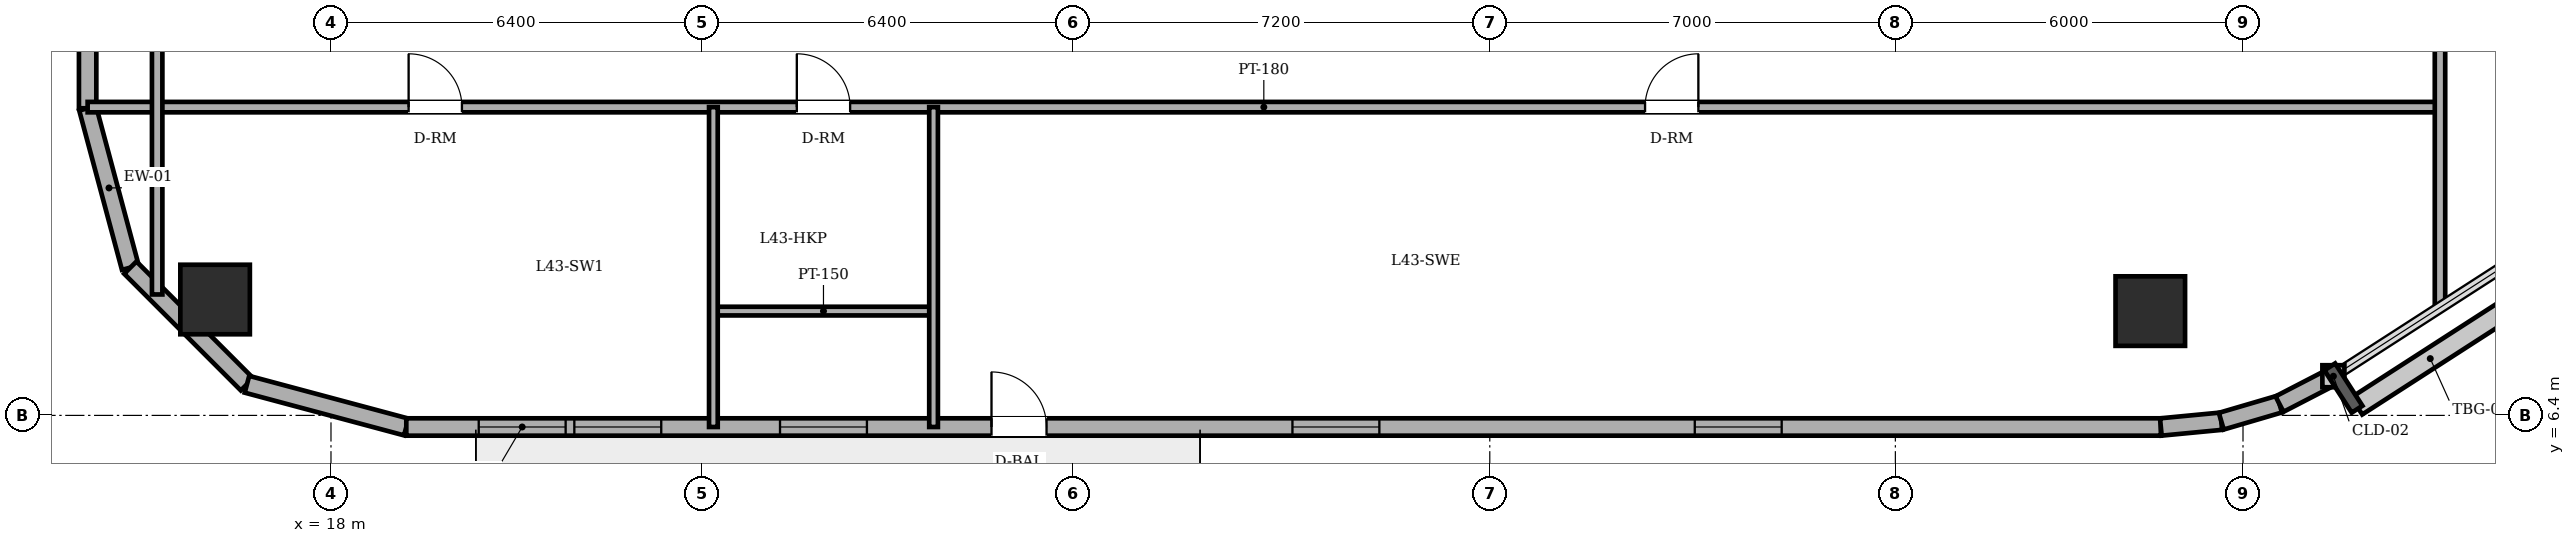
"""IFC4 building model, lengths in metres.
Left out: names, types, materials, properties, quantities, classifications, styles, units other than length and angle.
Written with IfcOpenShell. Run it as: python <this file> out.ifc"""

import sys

from ifc_helpers import new_model, si_unit, direction, frame, frame_2d, origin, origin_2d, place, context, subcontext, project, spatial, rectangle, circle, extrude, element, fill, save


model = new_model("IFC4")
c1 = context("Model", 3, precision=1e-05, world=origin(), true_north=direction((0.0, 1.0)))
c2 = subcontext(c1, "Body", "Model", "MODEL_VIEW")
j1 = project(units=[si_unit("LENGTHUNIT", "METRE"), si_unit("PLANEANGLEUNIT", "RADIAN")], contexts=[c1])
p1 = place(None, origin())
s1 = spatial("IfcSite", under=j1, at=p1, CompositionType="ELEMENT")
p2 = place(p1, origin())
s2 = spatial("IfcBuilding", under=s1, at=p2, CompositionType="ELEMENT")
p3 = place(p2, frame((0.0, 0.0, 165.4)))
s3 = spatial("IfcBuildingStorey", under=s2, at=p3, CompositionType="ELEMENT", Elevation=165.4)
for number, where, z_axis, x_axis in (
    (1, (16.0, 8.4, 0.0), (0.0, 0.0, 1.0), (1.0, 0.0, 0.0)),
    (2, (49.4, 8.2, 0.0), (0.0, 0.0, 1.0), (1.0, 0.0, 0.0)),
):
    element("IfcColumn", number, at=place(p3, frame(where, z_axis=z_axis, x_axis=x_axis)), inside=s3, PredefinedType="COLUMN", context=c2, shape_type="SweptSolid", body=[
        extrude(circle(Radius=0.6, at=origin_2d()), origin(), (0.0, 0.0, 1.0), 3.6),
    ])
p4 = place(p3, frame((13.8, 11.7, 0.0), z_axis=(0.0, 0.0, 1.0), x_axis=(0.258884674387, -0.965908238586, 0.0)))
e3 = element("IfcWall", 3, at=p4, inside=s3, PredefinedType="SOLIDWALL", context=c2, shape_type="SweptSolid", body=[
    extrude(rectangle(XDim=2.847, YDim=0.3, at=frame_2d((1.424, 0.0))), origin(), (0.0, 0.0, 1.0), 3.4),
])
p5 = place(p3, frame((14.537, 8.95, 0.0), z_axis=(0.0, 0.0, 1.0), x_axis=(0.707106781187, -0.707106781187, 0.0)))
e4 = element("IfcWall", 4, at=p5, inside=s3, PredefinedType="SOLIDWALL", context=c2, shape_type="SweptSolid", body=[
    extrude(rectangle(XDim=2.847, YDim=0.3, at=frame_2d((1.423, 0.0))), origin(), (0.0, 0.0, 1.0), 3.4),
])
p6 = place(p3, frame((16.55, 6.937, 0.0), z_axis=(0.0, 0.0, 1.0), x_axis=(0.965908238586, -0.258884674387, 0.0)))
e5 = element("IfcWall", 5, at=p6, inside=s3, PredefinedType="SOLIDWALL", context=c2, shape_type="SweptSolid", body=[
    extrude(rectangle(XDim=2.847, YDim=0.3, at=frame_2d((1.424, 0.0))), origin(), (0.0, 0.0, 1.0), 3.4),
])
p7 = place(p3, frame((19.3, 6.2, 0.0), z_axis=(0.0, 0.0, 1.0), x_axis=(1.0, 0.0, 0.0)))
e6 = element("IfcWall", 6, at=p7, inside=s3, PredefinedType="SOLIDWALL", context=c2, shape_type="SweptSolid", body=[
    extrude(rectangle(XDim=30.282, YDim=0.3, at=frame_2d((15.141, 0.0))), origin(), (0.0, 0.0, 1.0), 3.4),
])
p8 = place(p7, frame((10.1, 0.0, 0.0)))
e7 = element("IfcOpeningElement", 7, at=p8, cuts=e6, PredefinedType="OPENING", context=c2, shape_type="SweptSolid", body=[
    extrude(rectangle(XDim=0.95, YDim=2.2, at=frame_2d((0.475, 1.1))), frame((0.0, 0.16, 0.0), z_axis=(0.0, -1.0, 0.0), x_axis=(1.0, 0.0, 0.0)), (0.0, 0.0, 1.0), 0.32),
])
p9 = place(p7, frame((1.25, 0.0, 0.85)))
e8 = element("IfcOpeningElement", 8, at=p9, cuts=e6, PredefinedType="OPENING", context=c2, shape_type="SweptSolid", body=[
    extrude(rectangle(XDim=1.5, YDim=1.55, at=frame_2d((0.75, 0.775))), frame((0.0, 0.16, 0.0), z_axis=(0.0, -1.0, 0.0), x_axis=(1.0, 0.0, 0.0)), (0.0, 0.0, 1.0), 0.32),
])
p10 = place(p7, frame((2.9, 0.0, 0.85)))
e9 = element("IfcOpeningElement", 9, at=p10, cuts=e6, PredefinedType="OPENING", context=c2, shape_type="SweptSolid", body=[
    extrude(rectangle(XDim=1.5, YDim=1.55, at=frame_2d((0.75, 0.775))), frame((0.0, 0.16, 0.0), z_axis=(0.0, -1.0, 0.0), x_axis=(1.0, 0.0, 0.0)), (0.0, 0.0, 1.0), 0.32),
])
p11 = place(p7, frame((6.45, 0.0, 0.85)))
e10 = element("IfcOpeningElement", 10, at=p11, cuts=e6, PredefinedType="OPENING", context=c2, shape_type="SweptSolid", body=[
    extrude(rectangle(XDim=1.5, YDim=1.55, at=frame_2d((0.75, 0.775))), frame((0.0, 0.16, 0.0), z_axis=(0.0, -1.0, 0.0), x_axis=(1.0, 0.0, 0.0)), (0.0, 0.0, 1.0), 0.32),
])
p12 = place(p7, frame((15.294, 0.0, 0.85)))
e11 = element("IfcOpeningElement", 11, at=p12, cuts=e6, PredefinedType="OPENING", context=c2, shape_type="SweptSolid", body=[
    extrude(rectangle(XDim=1.5, YDim=1.55, at=frame_2d((0.75, 0.775))), frame((0.0, 0.16, 0.0), z_axis=(0.0, -1.0, 0.0), x_axis=(1.0, 0.0, 0.0)), (0.0, 0.0, 1.0), 0.32),
])
p13 = place(p7, frame((22.238, 0.0, 0.85)))
e12 = element("IfcOpeningElement", 12, at=p13, cuts=e6, PredefinedType="OPENING", context=c2, shape_type="SweptSolid", body=[
    extrude(rectangle(XDim=1.5, YDim=1.55, at=frame_2d((0.75, 0.775))), frame((0.0, 0.16, 0.0), z_axis=(0.0, -1.0, 0.0), x_axis=(1.0, 0.0, 0.0)), (0.0, 0.0, 1.0), 0.32),
])
p14 = place(p3, frame((49.582, 6.2, 0.0), z_axis=(0.0, 0.0, 1.0), x_axis=(0.995426089968, 0.095534807324, 0.0)))
e13 = element("IfcWall", 13, at=p14, inside=s3, PredefinedType="SOLIDWALL", context=c2, shape_type="SweptSolid", body=[
    extrude(rectangle(XDim=1.048, YDim=0.3, at=frame_2d((0.524, 0.0))), origin(), (0.0, 0.0, 1.0), 3.4),
])
p15 = place(p3, frame((50.625, 6.3, 0.0), z_axis=(0.0, 0.0, 1.0), x_axis=(0.959528674476, 0.281610942363, 0.0)))
e14 = element("IfcWall", 14, at=p15, inside=s3, PredefinedType="SOLIDWALL", context=c2, shape_type="SweptSolid", body=[
    extrude(rectangle(XDim=1.047, YDim=0.3, at=frame_2d((0.524, 0.0))), origin(), (0.0, 0.0, 1.0), 3.4),
])
p16 = place(p3, frame((51.63, 6.595, 0.0), z_axis=(0.0, 0.0, 1.0), x_axis=(0.888283247196, 0.459296062198, 0.0)))
e15 = element("IfcWall", 15, at=p16, inside=s3, PredefinedType="SOLIDWALL", context=c2, shape_type="SweptSolid", body=[
    extrude(rectangle(XDim=1.047, YDim=0.3, at=frame_2d((0.523, 0.0))), origin(), (0.0, 0.0, 1.0), 3.4),
])
p17 = place(p3, frame((13.8, 36.3, 0.0), z_axis=(0.0, 0.0, 1.0), x_axis=(0.0, -1.0, 0.0)))
e16 = element("IfcWall", 16, at=p17, inside=s3, PredefinedType="SOLIDWALL", context=c2, shape_type="SweptSolid", body=[
    extrude(rectangle(XDim=24.6, YDim=0.3, at=frame_2d((12.3, 0.0))), origin(), (0.0, 0.0, 1.0), 3.4),
])
p18 = place(p17, frame((5.003, 0.0, 0.85)))
e17 = element("IfcOpeningElement", 17, at=p18, cuts=e16, PredefinedType="OPENING", context=c2, shape_type="SweptSolid", body=[
    extrude(rectangle(XDim=1.5, YDim=1.55, at=frame_2d((0.75, 0.775))), frame((0.0, 0.16, 0.0), z_axis=(0.0, -1.0, 0.0), x_axis=(1.0, 0.0, 0.0)), (0.0, 0.0, 1.0), 0.32),
])
p19 = place(p17, frame((8.277, 0.0, 0.85)))
e18 = element("IfcOpeningElement", 18, at=p19, cuts=e16, PredefinedType="OPENING", context=c2, shape_type="SweptSolid", body=[
    extrude(rectangle(XDim=1.5, YDim=1.55, at=frame_2d((0.75, 0.775))), frame((0.0, 0.16, 0.0), z_axis=(0.0, -1.0, 0.0), x_axis=(1.0, 0.0, 0.0)), (0.0, 0.0, 1.0), 0.32),
])
p20 = place(p17, frame((14.823, 0.0, 0.85)))
e19 = element("IfcOpeningElement", 19, at=p20, cuts=e16, PredefinedType="OPENING", context=c2, shape_type="SweptSolid", body=[
    extrude(rectangle(XDim=1.5, YDim=1.55, at=frame_2d((0.75, 0.775))), frame((0.0, 0.16, 0.0), z_axis=(0.0, -1.0, 0.0), x_axis=(1.0, 0.0, 0.0)), (0.0, 0.0, 1.0), 0.32),
])
p21 = place(p17, frame((18.097, 0.0, 0.85)))
e20 = element("IfcOpeningElement", 20, at=p21, cuts=e16, PredefinedType="OPENING", context=c2, shape_type="SweptSolid", body=[
    extrude(rectangle(XDim=1.5, YDim=1.55, at=frame_2d((0.75, 0.775))), frame((0.0, 0.16, 0.0), z_axis=(0.0, -1.0, 0.0), x_axis=(1.0, 0.0, 0.0)), (0.0, 0.0, 1.0), 0.32),
])
p22 = place(p3, frame((24.6, 8.2, 0.0), z_axis=(0.0, 0.0, 1.0), x_axis=(1.0, 0.0, 0.0)))
e21 = element("IfcWall", 21, at=p22, inside=s3, PredefinedType="PARTITIONING", context=c2, shape_type="SweptSolid", body=[
    extrude(rectangle(XDim=3.8, YDim=0.15, at=frame_2d((1.9, 0.0))), origin(), (0.0, 0.0, 1.0), 2.882),
])
p23 = place(p3, frame((13.8, 11.72, 0.0), z_axis=(0.0, 0.0, 1.0), x_axis=(1.0, 0.0, 0.0)))
e22 = element("IfcWall", 22, at=p23, inside=s3, PredefinedType="PARTITIONING", context=c2, shape_type="SweptSolid", body=[
    extrude(rectangle(XDim=40.6, YDim=0.18, at=frame_2d((20.3, 0.0))), origin(), (0.0, 0.0, 1.0), 3.4),
])
p24 = place(p23, frame((12.24, 0.0, 0.0)))
e23 = element("IfcOpeningElement", 23, at=p24, cuts=e22, PredefinedType="OPENING", context=c2, shape_type="SweptSolid", body=[
    extrude(rectangle(XDim=0.92, YDim=2.1, at=frame_2d((0.46, 1.05))), frame((0.0, 0.1, 0.0), z_axis=(0.0, -1.0, 0.0), x_axis=(1.0, 0.0, 0.0)), (0.0, 0.0, 1.0), 0.2),
])
p25 = place(p23, frame((5.54, 0.0, 0.0)))
e24 = element("IfcOpeningElement", 24, at=p25, cuts=e22, PredefinedType="OPENING", context=c2, shape_type="SweptSolid", body=[
    extrude(rectangle(XDim=0.92, YDim=2.1, at=frame_2d((0.46, 1.05))), frame((0.0, 0.1, 0.0), z_axis=(0.0, -1.0, 0.0), x_axis=(1.0, 0.0, 0.0)), (0.0, 0.0, 1.0), 0.2),
])
p26 = place(p23, frame((26.88, 0.0, 0.0)))
e25 = element("IfcOpeningElement", 25, at=p26, cuts=e22, PredefinedType="OPENING", context=c2, shape_type="SweptSolid", body=[
    extrude(rectangle(XDim=0.92, YDim=2.1, at=frame_2d((0.46, 1.05))), frame((0.0, 0.1, 0.0), z_axis=(0.0, -1.0, 0.0), x_axis=(1.0, 0.0, 0.0)), (0.0, 0.0, 1.0), 0.2),
])
p27 = place(p3, frame((15.0, 8.487, 0.0), z_axis=(0.0, 0.0, 1.0), x_axis=(0.0, 1.0, 0.0)))
e26 = element("IfcWall", 26, at=p27, inside=s3, PredefinedType="PARTITIONING", context=c2, shape_type="SweptSolid", body=[
    extrude(rectangle(XDim=5.693, YDim=0.18, at=frame_2d((2.846, 0.0))), origin(), (0.0, 0.0, 1.0), 3.4),
])
for number, where, z_axis, x_axis in (
    (27, (24.6, 6.2, 0.0), (0.0, 0.0, 1.0), (0.0, 1.0, 0.0)),
    (28, (28.4, 6.2, 0.0), (0.0, 0.0, 1.0), (0.0, 1.0, 0.0)),
):
    element("IfcWall", number, at=place(p3, frame(where, z_axis=z_axis, x_axis=x_axis)), inside=s3, PredefinedType="PARTITIONING", context=c2, shape_type="SweptSolid", body=[
        extrude(rectangle(XDim=5.52, YDim=0.15, at=frame_2d((2.76, 0.0))), origin(), (0.0, 0.0, 1.0), 3.4),
    ])
p28 = place(p3, frame((54.4, 8.261, 0.0), z_axis=(0.0, 0.0, 1.0), x_axis=(0.0, 1.0, 0.0)))
e29 = element("IfcWall", 29, at=p28, inside=s3, PredefinedType="PARTITIONING", context=c2, shape_type="SweptSolid", body=[
    extrude(rectangle(XDim=22.089, YDim=0.18, at=frame_2d((11.044, 0.0))), origin(), (0.0, 0.0, 1.0), 3.4),
])
p29 = place(p28, frame((17.694, 0.0, 0.0)))
e30 = element("IfcOpeningElement", 30, at=p29, cuts=e29, PredefinedType="OPENING", context=c2, shape_type="SweptSolid", body=[
    extrude(rectangle(XDim=0.92, YDim=2.1, at=frame_2d((0.46, 1.05))), frame((0.0, 0.1, 0.0), z_axis=(0.0, -1.0, 0.0), x_axis=(1.0, 0.0, 0.0)), (0.0, 0.0, 1.0), 0.2),
])
p30 = place(p28, frame((10.771, 0.0, 0.0)))
e31 = element("IfcOpeningElement", 31, at=p30, cuts=e29, PredefinedType="OPENING", context=c2, shape_type="SweptSolid", body=[
    extrude(rectangle(XDim=0.92, YDim=2.1, at=frame_2d((0.46, 1.05))), frame((0.0, 0.1, 0.0), z_axis=(0.0, -1.0, 0.0), x_axis=(1.0, 0.0, 0.0)), (0.0, 0.0, 1.0), 0.2),
])
p31 = place(p8, origin())
e32 = element("IfcDoor", 32, at=p31, inside=s3, OperationType="SINGLE_SWING_LEFT", PredefinedType="DOOR", context=c2, shape_type="SweptSolid", body=[
    extrude(rectangle(XDim=0.95, YDim=2.2, at=frame_2d((0.475, 1.1))), frame((0.0, 0.025, 0.0), z_axis=(0.0, -1.0, 0.0), x_axis=(1.0, 0.0, 0.0)), (0.0, 0.0, 1.0), 0.05),
])
fill(e7, e32)
p32 = place(p9, origin())
e33 = element("IfcWindow", 33, at=p32, inside=s3, PartitioningType="DOUBLE_PANEL_VERTICAL", PredefinedType="WINDOW", context=c2, shape_type="SweptSolid", body=[
    extrude(rectangle(XDim=1.5, YDim=1.55, at=frame_2d((0.75, 0.775))), frame((0.0, 0.03, 0.0), z_axis=(0.0, -1.0, 0.0), x_axis=(1.0, 0.0, 0.0)), (0.0, 0.0, 1.0), 0.06),
])
fill(e8, e33)
p33 = place(p10, origin())
e34 = element("IfcWindow", 34, at=p33, inside=s3, PartitioningType="DOUBLE_PANEL_VERTICAL", PredefinedType="WINDOW", context=c2, shape_type="SweptSolid", body=[
    extrude(rectangle(XDim=1.5, YDim=1.55, at=frame_2d((0.75, 0.775))), frame((0.0, 0.03, 0.0), z_axis=(0.0, -1.0, 0.0), x_axis=(1.0, 0.0, 0.0)), (0.0, 0.0, 1.0), 0.06),
])
fill(e9, e34)
p34 = place(p11, origin())
e35 = element("IfcWindow", 35, at=p34, inside=s3, PartitioningType="DOUBLE_PANEL_VERTICAL", PredefinedType="WINDOW", context=c2, shape_type="SweptSolid", body=[
    extrude(rectangle(XDim=1.5, YDim=1.55, at=frame_2d((0.75, 0.775))), frame((0.0, 0.03, 0.0), z_axis=(0.0, -1.0, 0.0), x_axis=(1.0, 0.0, 0.0)), (0.0, 0.0, 1.0), 0.06),
])
fill(e10, e35)
p35 = place(p12, origin())
e36 = element("IfcWindow", 36, at=p35, inside=s3, PartitioningType="DOUBLE_PANEL_VERTICAL", PredefinedType="WINDOW", context=c2, shape_type="SweptSolid", body=[
    extrude(rectangle(XDim=1.5, YDim=1.55, at=frame_2d((0.75, 0.775))), frame((0.0, 0.03, 0.0), z_axis=(0.0, -1.0, 0.0), x_axis=(1.0, 0.0, 0.0)), (0.0, 0.0, 1.0), 0.06),
])
fill(e11, e36)
p36 = place(p13, origin())
e37 = element("IfcWindow", 37, at=p36, inside=s3, PartitioningType="DOUBLE_PANEL_VERTICAL", PredefinedType="WINDOW", context=c2, shape_type="SweptSolid", body=[
    extrude(rectangle(XDim=1.5, YDim=1.55, at=frame_2d((0.75, 0.775))), frame((0.0, 0.03, 0.0), z_axis=(0.0, -1.0, 0.0), x_axis=(1.0, 0.0, 0.0)), (0.0, 0.0, 1.0), 0.06),
])
fill(e12, e37)
p37 = place(p24, origin())
e38 = element("IfcDoor", 38, at=p37, inside=s3, OperationType="SINGLE_SWING_LEFT", PredefinedType="DOOR", context=c2, shape_type="SweptSolid", body=[
    extrude(rectangle(XDim=0.92, YDim=2.1, at=frame_2d((0.46, 1.05))), frame((0.0, 0.025, 0.0), z_axis=(0.0, -1.0, 0.0), x_axis=(1.0, 0.0, 0.0)), (0.0, 0.0, 1.0), 0.05),
])
fill(e23, e38)
p38 = place(p25, origin())
e39 = element("IfcDoor", 39, at=p38, inside=s3, OperationType="SINGLE_SWING_LEFT", PredefinedType="DOOR", context=c2, shape_type="SweptSolid", body=[
    extrude(rectangle(XDim=0.92, YDim=2.1, at=frame_2d((0.46, 1.05))), frame((0.0, 0.025, 0.0), z_axis=(0.0, -1.0, 0.0), x_axis=(1.0, 0.0, 0.0)), (0.0, 0.0, 1.0), 0.05),
])
fill(e24, e39)
p39 = place(p26, origin())
e40 = element("IfcDoor", 40, at=p39, inside=s3, OperationType="SINGLE_SWING_RIGHT", PredefinedType="DOOR", context=c2, shape_type="SweptSolid", body=[
    extrude(rectangle(XDim=0.92, YDim=2.1, at=frame_2d((0.46, 1.05))), frame((0.0, 0.025, 0.0), z_axis=(0.0, -1.0, 0.0), x_axis=(1.0, 0.0, 0.0)), (0.0, 0.0, 1.0), 0.05),
])
fill(e25, e40)
save(model, sys.argv[1])
